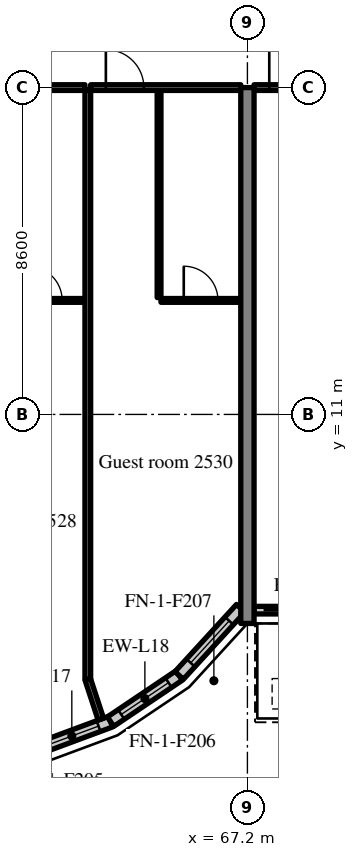
"""IFC4 building model, lengths in metres.
Left out: names, types, materials, properties, quantities, classifications, styles, units other than length and angle.
Written with IfcOpenShell. Run it as: python <this file> out.ifc"""

import sys

from ifc_helpers import new_model, si_unit, direction, frame, frame_2d, origin, place, context, subcontext, project, spatial, rectangle, extrude, source, transform, mapped, element, fill, save


model = new_model("IFC4")
c1 = context("Model", 3, precision=1e-05, world=origin(), true_north=direction((0.0, 1.0)))
c2 = subcontext(c1, "Body", "Model", "MODEL_VIEW")
j1 = project(units=[si_unit("LENGTHUNIT", "METRE"), si_unit("PLANEANGLEUNIT", "RADIAN")], contexts=[c1])
p1 = place(None, origin())
s1 = spatial("IfcSite", under=j1, at=p1, CompositionType="ELEMENT")
p2 = place(p1, origin())
s2 = spatial("IfcBuilding", under=s1, at=p2, CompositionType="ELEMENT")
p3 = place(p2, frame((0.0, 0.0, 106.6)))
s3 = spatial("IfcBuildingStorey", under=s2, at=p3, CompositionType="ELEMENT", Elevation=106.6)
m1 = source(origin(), c2, "Body", "SweptSolid", [
    extrude(rectangle(XDim=14.1, YDim=0.35, at=frame_2d((7.05, 0.0))), origin(), (0.0, 0.0, 1.0), 3.52),
])
p4 = place(p3, frame((67.2, 5.5, 0.0), z_axis=(0.0, 0.0, 1.0), x_axis=(0.0, 1.0, 0.0)))
e1 = element("IfcWall", 1, at=p4, inside=s3, PredefinedType="SHEAR", context=c2, shape_type="MappedRepresentation", body=[
    mapped(m1, transform((0.0, 0.0, 0.0), scale=1.0)),
])
m2 = source(origin(), c2, "Body", "SweptSolid", [
    extrude(rectangle(XDim=2.176, YDim=0.3, at=frame_2d((1.088, 0.0))), origin(), (0.0, 0.0, 1.0), 3.52),
])
p5 = place(p3, frame((61.56, 2.16, 0.0), z_axis=(0.0, 0.0, 1.0), x_axis=(0.937531979054, 0.347899106424, 0.0)))
e2 = element("IfcWall", 2, at=p5, inside=s3, PredefinedType="SOLIDWALL", context=c2, shape_type="MappedRepresentation", body=[
    mapped(m2, transform((0.0, 0.0, 0.0), scale=1.0)),
])
m3 = source(origin(), c2, "Body", "SweptSolid", [
    extrude(rectangle(XDim=1.5, YDim=2.0, at=frame_2d((0.75, 1.0))), frame((0.0, 0.16, 0.0), z_axis=(0.0, -1.0, 0.0), x_axis=(1.0, 0.0, 0.0)), (0.0, 0.0, 1.0), 0.32),
])
p6 = place(p5, frame((0.338, 0.0, 0.9)))
e3 = element("IfcOpeningElement", 3, at=p6, cuts=e2, PredefinedType="OPENING", context=c2, shape_type="MappedRepresentation", body=[
    mapped(m3, transform((0.0, 0.0, 0.0), scale=1.0)),
])
m4 = source(origin(), c2, "Body", "SweptSolid", [
    extrude(rectangle(XDim=2.176, YDim=0.3, at=frame_2d((1.088, 0.0))), origin(), (0.0, 0.0, 1.0), 3.52),
])
p7 = place(p3, frame((63.599, 2.917, 0.0), z_axis=(0.0, 0.0, 1.0), x_axis=(0.829625727223, 0.558319937607, 0.0)))
e4 = element("IfcWall", 4, at=p7, inside=s3, PredefinedType="SOLIDWALL", context=c2, shape_type="MappedRepresentation", body=[
    mapped(m4, transform((0.0, 0.0, 0.0), scale=1.0)),
])
p8 = place(p7, frame((0.338, 0.0, 0.9)))
e5 = element("IfcOpeningElement", 5, at=p8, cuts=e4, PredefinedType="OPENING", context=c2, shape_type="MappedRepresentation", body=[
    mapped(m3, transform((0.0, 0.0, 0.0), scale=1.0)),
])
m5 = source(origin(), c2, "Body", "SweptSolid", [
    extrude(rectangle(XDim=2.398, YDim=0.3, at=frame_2d((1.199, 0.0))), origin(), (0.0, 0.0, 1.0), 3.52),
])
p9 = place(p3, frame((65.404, 4.131, 0.0), z_axis=(0.0, 0.0, 1.0), x_axis=(0.675374189419, 0.737475222815, 0.0)))
e6 = element("IfcWall", 6, at=p9, inside=s3, PredefinedType="SOLIDWALL", context=c2, shape_type="MappedRepresentation", body=[
    mapped(m5, transform((0.0, 0.0, 0.0), scale=1.0)),
])
p10 = place(p9, frame((0.449, 0.0, 0.9)))
e7 = element("IfcOpeningElement", 7, at=p10, cuts=e6, PredefinedType="OPENING", context=c2, shape_type="MappedRepresentation", body=[
    mapped(m3, transform((0.0, 0.0, 0.0), scale=1.0)),
])
m6 = source(origin(), c2, "Body", "SweptSolid", [
    extrude(rectangle(XDim=8.05, YDim=0.2, at=frame_2d((4.025, 0.0))), origin(), (0.0, 0.0, 1.0), 2.82),
])
p11 = place(p3, frame((67.375, 5.85, 0.0), z_axis=(0.0, 0.0, 1.0), x_axis=(1.0, 0.0, 0.0)))
e8 = element("IfcWall", 8, at=p11, inside=s3, PredefinedType="SOLIDWALL", context=c2, shape_type="MappedRepresentation", body=[
    mapped(m6, transform((0.0, 0.0, 0.0), scale=1.0)),
])
m7 = source(origin(), c2, "Body", "SweptSolid", [
    extrude(rectangle(XDim=1.2, YDim=2.4, at=frame_2d((0.6, 1.2))), frame((0.0, 0.11, 0.0), z_axis=(0.0, -1.0, 0.0), x_axis=(1.0, 0.0, 0.0)), (0.0, 0.0, 1.0), 0.22),
])
p12 = place(p11, frame((0.25, 0.0, 0.0)))
e9 = element("IfcOpeningElement", 9, at=p12, cuts=e8, PredefinedType="OPENING", context=c2, shape_type="MappedRepresentation", body=[
    mapped(m7, transform((0.0, 0.0, 0.0), scale=1.0)),
])
m8 = source(origin(), c2, "Body", "SweptSolid", [
    extrude(rectangle(XDim=1.5, YDim=1.5, at=frame_2d((0.75, 0.75))), frame((0.0, 0.11, 0.0), z_axis=(0.0, -1.0, 0.0), x_axis=(1.0, 0.0, 0.0)), (0.0, 0.0, 1.0), 0.22),
])
p13 = place(p11, frame((2.275, 0.0, 0.9)))
e10 = element("IfcOpeningElement", 10, at=p13, cuts=e8, PredefinedType="OPENING", context=c2, shape_type="MappedRepresentation", body=[
    mapped(m8, transform((0.0, 0.0, 0.0), scale=1.0)),
])
p14 = place(p11, frame((4.275, 0.0, 0.0)))
e11 = element("IfcOpeningElement", 11, at=p14, cuts=e8, PredefinedType="OPENING", context=c2, shape_type="MappedRepresentation", body=[
    mapped(m7, transform((0.0, 0.0, 0.0), scale=1.0)),
])
p15 = place(p11, frame((6.3, 0.0, 0.9)))
e12 = element("IfcOpeningElement", 12, at=p15, cuts=e8, PredefinedType="OPENING", context=c2, shape_type="MappedRepresentation", body=[
    mapped(m8, transform((0.0, 0.0, 0.0), scale=1.0)),
])
m9 = source(origin(), c2, "Body", "SweptSolid", [
    extrude(rectangle(XDim=2.1, YDim=0.1, at=frame_2d((1.05, 0.0))), origin(), (0.0, 0.0, 1.0), 3.52),
])
p16 = place(p3, frame((60.825, 14.0, 0.0), z_axis=(0.0, 0.0, 1.0), x_axis=(1.0, 0.0, 0.0)))
e13 = element("IfcWall", 13, at=p16, inside=s3, PredefinedType="PARTITIONING", context=c2, shape_type="MappedRepresentation", body=[
    mapped(m9, transform((0.0, 0.0, 0.0), scale=1.0)),
])
m10 = source(origin(), c2, "Body", "SweptSolid", [
    extrude(rectangle(XDim=0.9, YDim=2.1, at=frame_2d((0.45, 1.05))), frame((0.0, 0.06, 0.0), z_axis=(0.0, -1.0, 0.0), x_axis=(1.0, 0.0, 0.0)), (0.0, 0.0, 1.0), 0.12),
])
p17 = place(p16, frame((0.6, 0.0, 0.0)))
e14 = element("IfcOpeningElement", 14, at=p17, cuts=e13, PredefinedType="OPENING", context=c2, shape_type="MappedRepresentation", body=[
    mapped(m10, transform((0.0, 0.0, 0.0), scale=1.0)),
])
m11 = source(origin(), c2, "Body", "SweptSolid", [
    extrude(rectangle(XDim=3.95, YDim=0.15, at=frame_2d((1.975, 0.0))), origin(), (0.0, 0.0, 1.0), 2.82),
])
p18 = place(p3, frame((58.975, 19.6, 0.0), z_axis=(0.0, 0.0, 1.0), x_axis=(1.0, 0.0, 0.0)))
e15 = element("IfcWall", 15, at=p18, inside=s3, PredefinedType="PARTITIONING", context=c2, shape_type="MappedRepresentation", body=[
    mapped(m11, transform((0.0, 0.0, 0.0), scale=1.0)),
])
m12 = source(origin(), c2, "Body", "SweptSolid", [
    extrude(rectangle(XDim=1.0, YDim=2.1, at=frame_2d((0.5, 1.05))), frame((0.0, 0.085, 0.0), z_axis=(0.0, -1.0, 0.0), x_axis=(1.0, 0.0, 0.0)), (0.0, 0.0, 1.0), 0.17),
])
p19 = place(p18, frame((0.4, 0.0, 0.0)))
e16 = element("IfcOpeningElement", 16, at=p19, cuts=e15, PredefinedType="OPENING", context=c2, shape_type="MappedRepresentation", body=[
    mapped(m12, transform((0.0, 0.0, 0.0), scale=1.0)),
])
m13 = source(origin(), c2, "Body", "SweptSolid", [
    extrude(rectangle(XDim=5.45, YDim=0.1, at=frame_2d((2.725, 0.0))), origin(), (0.0, 0.0, 1.0), 3.52),
])
p20 = place(p3, frame((64.875, 14.075, 0.0), z_axis=(0.0, 0.0, 1.0), x_axis=(0.0, 1.0, 0.0)))
e17 = element("IfcWall", 17, at=p20, inside=s3, PredefinedType="PARTITIONING", context=c2, shape_type="MappedRepresentation", body=[
    mapped(m13, transform((0.0, 0.0, 0.0), scale=1.0)),
])
m14 = source(origin(), c2, "Body", "SweptSolid", [
    extrude(rectangle(XDim=2.1, YDim=0.1, at=frame_2d((1.05, 0.0))), origin(), (0.0, 0.0, 1.0), 3.52),
])
p21 = place(p3, frame((64.925, 14.0, 0.0), z_axis=(0.0, 0.0, 1.0), x_axis=(1.0, 0.0, 0.0)))
e18 = element("IfcWall", 18, at=p21, inside=s3, PredefinedType="PARTITIONING", context=c2, shape_type="MappedRepresentation", body=[
    mapped(m14, transform((0.0, 0.0, 0.0), scale=1.0)),
])
p22 = place(p21, frame((0.6, 0.0, 0.0)))
e19 = element("IfcOpeningElement", 19, at=p22, cuts=e18, PredefinedType="OPENING", context=c2, shape_type="MappedRepresentation", body=[
    mapped(m10, transform((0.0, 0.0, 0.0), scale=1.0)),
])
p23 = place(p3, frame((63.075, 19.6, 0.0), z_axis=(0.0, 0.0, 1.0), x_axis=(1.0, 0.0, 0.0)))
e20 = element("IfcWall", 20, at=p23, inside=s3, PredefinedType="PARTITIONING", context=c2, shape_type="MappedRepresentation", body=[
    mapped(m11, transform((0.0, 0.0, 0.0), scale=1.0)),
])
p24 = place(p23, frame((0.4, 0.0, 0.0)))
e21 = element("IfcOpeningElement", 21, at=p24, cuts=e20, PredefinedType="OPENING", context=c2, shape_type="MappedRepresentation", body=[
    mapped(m12, transform((0.0, 0.0, 0.0), scale=1.0)),
])
m15 = source(origin(), c2, "Body", "SweptSolid", [
    extrude(rectangle(XDim=15.498, YDim=0.15, at=frame_2d((7.749, 0.0))), origin(), (0.0, 0.0, 1.0), 3.52),
])
p25 = place(p3, frame((63.0, 4.027, 0.0), z_axis=(0.0, 0.0, 1.0), x_axis=(0.0, 1.0, 0.0)))
e22 = element("IfcWall", 22, at=p25, inside=s3, PredefinedType="PARTITIONING", context=c2, shape_type="MappedRepresentation", body=[
    mapped(m15, transform((0.0, 0.0, 0.0), scale=1.0)),
])
m16 = source(origin(), c2, "Body", "SweptSolid", [
    extrude(rectangle(XDim=8.05, YDim=0.15, at=frame_2d((4.025, 0.0))), origin(), (0.0, 0.0, 1.0), 2.82),
])
p26 = place(p3, frame((67.375, 19.6, 0.0), z_axis=(0.0, 0.0, 1.0), x_axis=(1.0, 0.0, 0.0)))
e23 = element("IfcWall", 23, at=p26, inside=s3, PredefinedType="PARTITIONING", context=c2, shape_type="MappedRepresentation", body=[
    mapped(m16, transform((0.0, 0.0, 0.0), scale=1.0)),
])
p27 = place(p26, frame((0.4, 0.0, 0.0)))
e24 = element("IfcOpeningElement", 24, at=p27, cuts=e23, PredefinedType="OPENING", context=c2, shape_type="MappedRepresentation", body=[
    mapped(m12, transform((0.0, 0.0, 0.0), scale=1.0)),
])
m17 = source(origin(), c2, "Body", "SweptSolid", [
    extrude(rectangle(XDim=1.101, YDim=0.15, at=frame_2d((0.55, 0.0))), origin(), (0.0, 0.0, 1.0), 3.52),
])
p28 = place(p3, frame((63.343, 2.981, 0.0), z_axis=(0.0, 0.0, 1.0), x_axis=(-0.311567081539, 0.950224159712, 0.0)))
e25 = element("IfcWall", 25, at=p28, inside=s3, PredefinedType="PARTITIONING", context=c2, shape_type="MappedRepresentation", body=[
    mapped(m17, transform((0.0, 0.0, 0.0), scale=1.0)),
])
m18 = source(origin(), c2, "Body", "SweptSolid", [
    extrude(rectangle(XDim=1.5, YDim=2.0, at=frame_2d((0.75, 1.0))), frame((0.0, 0.03, 0.0), z_axis=(0.0, -1.0, 0.0), x_axis=(1.0, 0.0, 0.0)), (0.0, 0.0, 1.0), 0.06),
])
p29 = place(p6, origin())
e26 = element("IfcWindow", 26, at=p29, inside=s3, PartitioningType="SINGLE_PANEL", PredefinedType="WINDOW", context=c2, shape_type="MappedRepresentation", body=[
    mapped(m18, transform((0.0, 0.0, 0.0), scale=1.0)),
])
fill(e3, e26)
p30 = place(p8, origin())
e27 = element("IfcWindow", 27, at=p30, inside=s3, PartitioningType="SINGLE_PANEL", PredefinedType="WINDOW", context=c2, shape_type="MappedRepresentation", body=[
    mapped(m18, transform((0.0, 0.0, 0.0), scale=1.0)),
])
fill(e5, e27)
p31 = place(p10, origin())
e28 = element("IfcWindow", 28, at=p31, inside=s3, PartitioningType="SINGLE_PANEL", PredefinedType="WINDOW", context=c2, shape_type="MappedRepresentation", body=[
    mapped(m18, transform((0.0, 0.0, 0.0), scale=1.0)),
])
fill(e7, e28)
m19 = source(origin(), c2, "Body", "SweptSolid", [
    extrude(rectangle(XDim=1.2, YDim=2.4, at=frame_2d((0.6, 1.2))), frame((0.0, 0.025, 0.0), z_axis=(0.0, -1.0, 0.0), x_axis=(1.0, 0.0, 0.0)), (0.0, 0.0, 1.0), 0.05),
])
p32 = place(p12, origin())
e29 = element("IfcDoor", 29, at=p32, inside=s3, OperationType="SLIDING_TO_RIGHT", PredefinedType="DOOR", context=c2, shape_type="MappedRepresentation", body=[
    mapped(m19, transform((0.0, 0.0, 0.0), scale=1.0)),
])
fill(e9, e29)
m20 = source(origin(), c2, "Body", "SweptSolid", [
    extrude(rectangle(XDim=0.9, YDim=2.1, at=frame_2d((0.45, 1.05))), frame((0.0, 0.025, 0.0), z_axis=(0.0, -1.0, 0.0), x_axis=(1.0, 0.0, 0.0)), (0.0, 0.0, 1.0), 0.05),
])
p33 = place(p17, origin())
e30 = element("IfcDoor", 30, at=p33, inside=s3, OperationType="SINGLE_SWING_LEFT", PredefinedType="DOOR", context=c2, shape_type="MappedRepresentation", body=[
    mapped(m20, transform((0.0, 0.0, 0.0), scale=1.0)),
])
fill(e14, e30)
p34 = place(p22, origin())
e31 = element("IfcDoor", 31, at=p34, inside=s3, OperationType="SINGLE_SWING_LEFT", PredefinedType="DOOR", context=c2, shape_type="MappedRepresentation", body=[
    mapped(m20, transform((0.0, 0.0, 0.0), scale=1.0)),
])
fill(e19, e31)
m21 = source(origin(), c2, "Body", "SweptSolid", [
    extrude(rectangle(XDim=1.0, YDim=2.1, at=frame_2d((0.5, 1.05))), frame((0.0, 0.025, 0.0), z_axis=(0.0, -1.0, 0.0), x_axis=(1.0, 0.0, 0.0)), (0.0, 0.0, 1.0), 0.05),
])
p35 = place(p24, origin())
e32 = element("IfcDoor", 32, at=p35, inside=s3, OperationType="SINGLE_SWING_LEFT", PredefinedType="DOOR", context=c2, shape_type="MappedRepresentation", body=[
    mapped(m21, transform((0.0, 0.0, 0.0), scale=1.0)),
])
fill(e21, e32)
p36 = place(p27, origin())
e33 = element("IfcDoor", 33, at=p36, inside=s3, OperationType="SINGLE_SWING_LEFT", PredefinedType="DOOR", context=c2, shape_type="MappedRepresentation", body=[
    mapped(m21, transform((0.0, 0.0, 0.0), scale=1.0)),
])
fill(e24, e33)
save(model, sys.argv[1])
